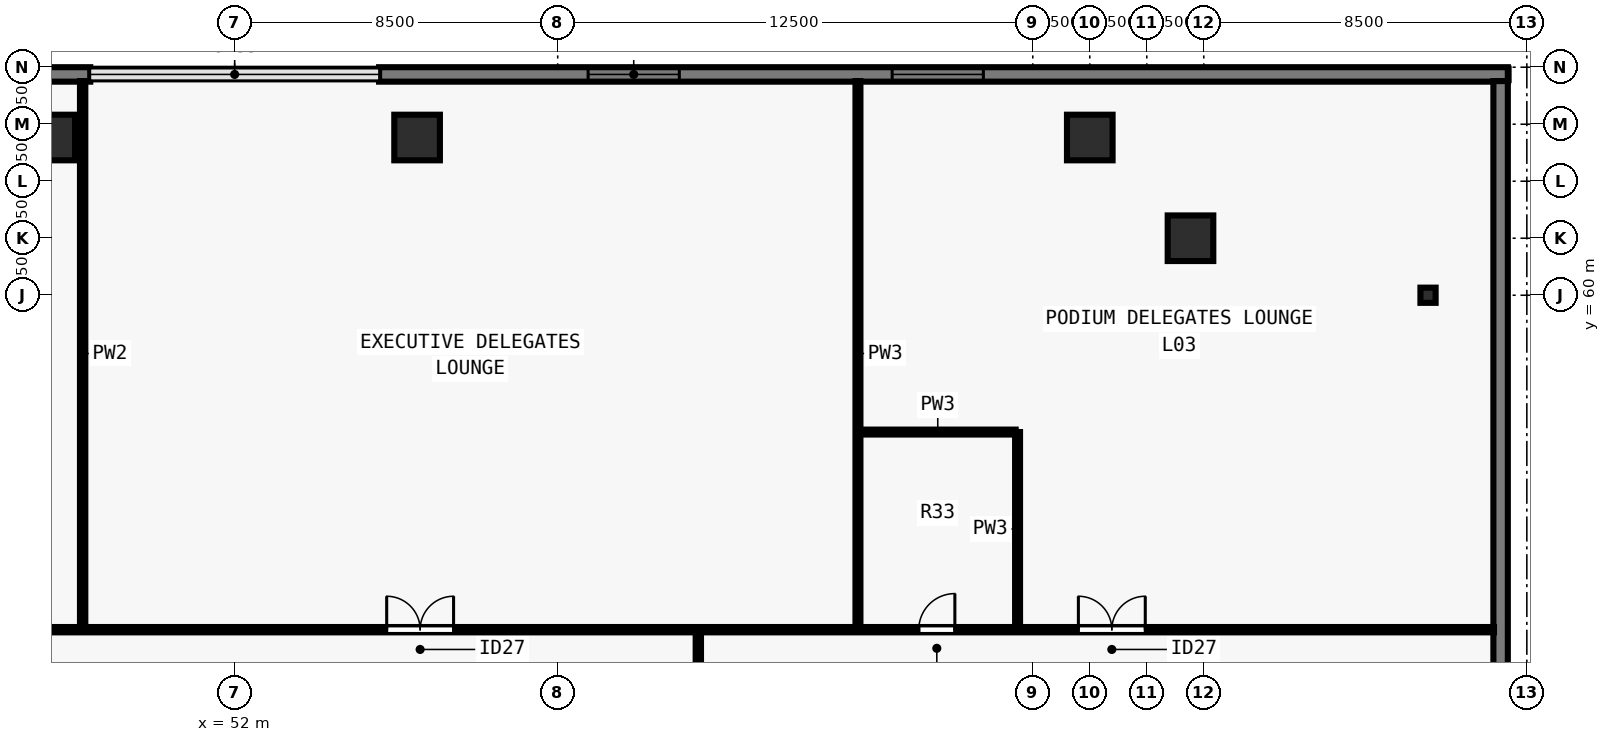
"""IFC4 building model, lengths in metres.
Left out: names, types, materials, properties, quantities, classifications, styles, units other than length and angle.
Written with IfcOpenShell. Run it as: python <this file> out.ifc"""

import sys

from ifc_helpers import new_model, si_unit, direction, frame, frame_2d, origin, origin_2d, place, context, subcontext, project, spatial, rectangle, i_section, extrude, element, fill, save


model = new_model("IFC4")
c1 = context("Model", 3, precision=1e-05, world=origin(), true_north=direction((0.0, 1.0)))
c2 = subcontext(c1, "Body", "Model", "MODEL_VIEW")
j1 = project(units=[si_unit("LENGTHUNIT", "METRE"), si_unit("PLANEANGLEUNIT", "RADIAN")], contexts=[c1])
p1 = place(None, origin())
s1 = spatial("IfcSite", under=j1, at=p1, CompositionType="ELEMENT")
p2 = place(p1, origin())
s2 = spatial("IfcBuilding", under=s1, at=p2, CompositionType="ELEMENT")
p3 = place(p2, frame((0.0, 0.0, 14.5)))
s3 = spatial("IfcBuildingStorey", under=s2, at=p3, CompositionType="ELEMENT", Elevation=14.5)
for number, where, z_axis, x_axis in (
    (1, (77.15, 61.5, 0.0), (0.0, 0.0, 1.0), (1.0, 0.0, 0.0)),
    (2, (74.5, 64.15, 0.0), (0.0, 0.0, 1.0), (1.0, 0.0, 0.0)),
    (3, (56.8, 64.15, 0.0), (0.0, 0.0, 1.0), (1.0, 0.0, 0.0)),
    (4, (47.2, 64.15, 0.0), (0.0, 0.0, 1.0), (1.0, 0.0, 0.0)),
):
    element("IfcColumn", number, at=place(p3, frame(where, z_axis=z_axis, x_axis=x_axis)), inside=s3, PredefinedType="COLUMN", context=c2, shape_type="SweptSolid", body=[
        extrude(rectangle(XDim=1.2, YDim=1.2, at=origin_2d()), origin(), (0.0, 0.0, 1.0), 4.5),
    ])
p4 = place(p3, frame((83.4, 60.0, 0.0), z_axis=(0.0, 0.0, 1.0), x_axis=(1.0, 0.0, 0.0)))
e5 = element("IfcColumn", 5, at=p4, inside=s3, PredefinedType="COLUMN", context=c2, shape_type="SweptSolid", body=[
    extrude(i_section(OverallWidth=0.4, OverallDepth=0.4, WebThickness=0.028, FlangeThickness=0.045, at=origin_2d()), origin(), (0.0, 0.0, 1.0), 4.5),
])
p5 = place(p3, frame((18.5, 65.81, 0.0), z_axis=(0.0, 0.0, 1.0), x_axis=(1.0, 0.0, 0.0)))
e6 = element("IfcWall", 6, at=p5, inside=s3, PredefinedType="SOLIDWALL", context=c2, shape_type="SweptSolid", body=[
    extrude(rectangle(XDim=29.7, YDim=0.38, at=frame_2d((14.85, 0.0))), origin(), (0.0, 0.0, 1.0), 4.15),
])
p6 = place(p5, frame((5.5, 0.0, 0.8)))
e7 = element("IfcOpeningElement", 7, at=p6, cuts=e6, PredefinedType="OPENING", context=c2, shape_type="SweptSolid", body=[
    extrude(rectangle(XDim=2.4, YDim=1.6, at=frame_2d((1.2, 0.8))), frame((0.0, 0.2, 0.0), z_axis=(0.0, -1.0, 0.0), x_axis=(1.0, 0.0, 0.0)), (0.0, 0.0, 1.0), 0.4),
])
p7 = place(p5, frame((13.5, 0.0, 0.8)))
e8 = element("IfcOpeningElement", 8, at=p7, cuts=e6, PredefinedType="OPENING", context=c2, shape_type="SweptSolid", body=[
    extrude(rectangle(XDim=2.4, YDim=1.6, at=frame_2d((1.2, 0.8))), frame((0.0, 0.2, 0.0), z_axis=(0.0, -1.0, 0.0), x_axis=(1.0, 0.0, 0.0)), (0.0, 0.0, 1.0), 0.4),
])
p8 = place(p3, frame((55.8, 65.81, 0.0), z_axis=(0.0, 0.0, 1.0), x_axis=(1.0, 0.0, 0.0)))
e9 = element("IfcWall", 9, at=p8, inside=s3, PredefinedType="SOLIDWALL", context=c2, shape_type="SweptSolid", body=[
    extrude(rectangle(XDim=29.7, YDim=0.38, at=frame_2d((14.85, 0.0))), origin(), (0.0, 0.0, 1.0), 4.15),
])
p9 = place(p8, frame((5.5, 0.0, 0.8)))
e10 = element("IfcOpeningElement", 10, at=p9, cuts=e9, PredefinedType="OPENING", context=c2, shape_type="SweptSolid", body=[
    extrude(rectangle(XDim=2.4, YDim=1.6, at=frame_2d((1.2, 0.8))), frame((0.0, 0.2, 0.0), z_axis=(0.0, -1.0, 0.0), x_axis=(1.0, 0.0, 0.0)), (0.0, 0.0, 1.0), 0.4),
])
p10 = place(p8, frame((13.5, 0.0, 0.8)))
e11 = element("IfcOpeningElement", 11, at=p10, cuts=e9, PredefinedType="OPENING", context=c2, shape_type="SweptSolid", body=[
    extrude(rectangle(XDim=2.4, YDim=1.6, at=frame_2d((1.2, 0.8))), frame((0.0, 0.2, 0.0), z_axis=(0.0, -1.0, 0.0), x_axis=(1.0, 0.0, 0.0)), (0.0, 0.0, 1.0), 0.4),
])
p11 = place(p3, frame((85.31, 65.635, 0.0), z_axis=(0.0, 0.0, 1.0), x_axis=(0.0, -1.0, 0.0)))
e12 = element("IfcWall", 12, at=p11, inside=s3, PredefinedType="SOLIDWALL", context=c2, shape_type="SweptSolid", body=[
    extrude(rectangle(XDim=53.27, YDim=0.38, at=frame_2d((26.635, 0.0))), origin(), (0.0, 0.0, 1.0), 4.15),
])
p12 = place(p3, frame((18.865, 51.2, 0.0), z_axis=(0.0, 0.0, 1.0), x_axis=(1.0, 0.0, 0.0)))
e13 = element("IfcWall", 13, at=p12, inside=s3, PredefinedType="PARTITIONING", context=c2, shape_type="SweptSolid", body=[
    extrude(rectangle(XDim=66.27, YDim=0.14, at=frame_2d((33.135, 0.0))), origin(), (0.0, 0.0, 1.0), 3.668),
])
p13 = place(p12, frame((24.335, 0.0, 0.0)))
e14 = element("IfcOpeningElement", 14, at=p13, cuts=e13, PredefinedType="OPENING", context=c2, shape_type="SweptSolid", body=[
    extrude(rectangle(XDim=1.76, YDim=2.2, at=frame_2d((0.88, 1.1))), frame((0.0, 0.08, 0.0), z_axis=(0.0, -1.0, 0.0), x_axis=(1.0, 0.0, 0.0)), (0.0, 0.0, 1.0), 0.16),
])
p14 = place(p12, frame((37.135, 0.0, 0.0)))
e15 = element("IfcOpeningElement", 15, at=p14, cuts=e13, PredefinedType="OPENING", context=c2, shape_type="SweptSolid", body=[
    extrude(rectangle(XDim=1.76, YDim=2.2, at=frame_2d((0.88, 1.1))), frame((0.0, 0.08, 0.0), z_axis=(0.0, -1.0, 0.0), x_axis=(1.0, 0.0, 0.0)), (0.0, 0.0, 1.0), 0.16),
])
p15 = place(p12, frame((51.135, 0.0, 0.0)))
e16 = element("IfcOpeningElement", 16, at=p15, cuts=e13, PredefinedType="OPENING", context=c2, shape_type="SweptSolid", body=[
    extrude(rectangle(XDim=0.95, YDim=2.1, at=frame_2d((0.475, 1.05))), frame((0.0, 0.08, 0.0), z_axis=(0.0, -1.0, 0.0), x_axis=(1.0, 0.0, 0.0)), (0.0, 0.0, 1.0), 0.16),
])
p16 = place(p12, frame((55.335, 0.0, 0.0)))
e17 = element("IfcOpeningElement", 17, at=p16, cuts=e13, PredefinedType="OPENING", context=c2, shape_type="SweptSolid", body=[
    extrude(rectangle(XDim=1.76, YDim=2.2, at=frame_2d((0.88, 1.1))), frame((0.0, 0.08, 0.0), z_axis=(0.0, -1.0, 0.0), x_axis=(1.0, 0.0, 0.0)), (0.0, 0.0, 1.0), 0.16),
])
p17 = place(p3, frame((64.2, 26.855, 0.0), z_axis=(0.0, 0.0, 1.0), x_axis=(0.0, 1.0, 0.0)))
e18 = element("IfcWall", 18, at=p17, inside=s3, PredefinedType="PARTITIONING", context=c2, shape_type="SweptSolid", body=[
    extrude(rectangle(XDim=24.29, YDim=0.14, at=frame_2d((12.145, 0.0))), origin(), (0.0, 0.0, 1.0), 4.15),
])
p18 = place(p17, frame((10.945, 0.0, 0.0)))
e19 = element("IfcOpeningElement", 19, at=p18, cuts=e18, PredefinedType="OPENING", context=c2, shape_type="SweptSolid", body=[
    extrude(rectangle(XDim=1.76, YDim=2.2, at=frame_2d((0.88, 1.1))), frame((0.0, 0.08, 0.0), z_axis=(0.0, -1.0, 0.0), x_axis=(1.0, 0.0, 0.0)), (0.0, 0.0, 1.0), 0.16),
])
p19 = place(p3, frame((48.0, 51.3, 0.0), z_axis=(0.0, 0.0, 1.0), x_axis=(0.0, 1.0, 0.0)))
e20 = element("IfcWall", 20, at=p19, inside=s3, PredefinedType="PARTITIONING", context=c2, shape_type="SweptSolid", body=[
    extrude(rectangle(XDim=14.335, YDim=0.14, at=frame_2d((7.167, 0.0))), origin(), (0.0, 0.0, 1.0), 4.15),
])
p20 = place(p3, frame((68.4, 51.3, 0.0), z_axis=(0.0, 0.0, 1.0), x_axis=(0.0, 1.0, 0.0)))
e21 = element("IfcWall", 21, at=p20, inside=s3, PredefinedType="PLUMBINGWALL", context=c2, shape_type="SweptSolid", body=[
    extrude(rectangle(XDim=14.335, YDim=0.13, at=frame_2d((7.167, 0.0))), origin(), (0.0, 0.0, 1.0), 3.201),
])
p21 = place(p3, frame((72.6, 51.3, 0.0), z_axis=(0.0, 0.0, 1.0), x_axis=(0.0, 1.0, 0.0)))
e22 = element("IfcWall", 22, at=p21, inside=s3, PredefinedType="PLUMBINGWALL", context=c2, shape_type="SweptSolid", body=[
    extrude(rectangle(XDim=5.1, YDim=0.13, at=frame_2d((2.55, 0.0))), origin(), (0.0, 0.0, 1.0), 4.15),
])
p22 = place(p3, frame((68.45, 56.4, 0.0), z_axis=(0.0, 0.0, 1.0), x_axis=(1.0, 0.0, 0.0)))
e23 = element("IfcWall", 23, at=p22, inside=s3, PredefinedType="PLUMBINGWALL", context=c2, shape_type="SweptSolid", body=[
    extrude(rectangle(XDim=4.1, YDim=0.13, at=frame_2d((2.05, 0.0))), origin(), (0.0, 0.0, 1.0), 3.668),
])
p23 = place(p9, origin())
e24 = element("IfcWindow", 24, at=p23, inside=s3, PartitioningType="SINGLE_PANEL", PredefinedType="WINDOW", context=c2, shape_type="SweptSolid", body=[
    extrude(rectangle(XDim=2.4, YDim=1.6, at=frame_2d((1.2, 0.8))), frame((0.0, -0.05, 0.0), z_axis=(0.0, -1.0, 0.0), x_axis=(1.0, 0.0, 0.0)), (0.0, 0.0, 1.0), 0.06),
])
fill(e10, e24)
p24 = place(p10, origin())
e25 = element("IfcWindow", 25, at=p24, inside=s3, PartitioningType="SINGLE_PANEL", PredefinedType="WINDOW", context=c2, shape_type="SweptSolid", body=[
    extrude(rectangle(XDim=2.4, YDim=1.6, at=frame_2d((1.2, 0.8))), frame((0.0, -0.05, 0.0), z_axis=(0.0, -1.0, 0.0), x_axis=(1.0, 0.0, 0.0)), (0.0, 0.0, 1.0), 0.06),
])
fill(e11, e25)
p25 = place(p14, origin())
e26 = element("IfcDoor", 26, at=p25, inside=s3, OperationType="DOUBLE_DOOR_SINGLE_SWING", PredefinedType="DOOR", context=c2, shape_type="SweptSolid", body=[
    extrude(rectangle(XDim=1.76, YDim=2.2, at=frame_2d((0.88, 1.1))), frame((0.0, 0.025, 0.0), z_axis=(0.0, -1.0, 0.0), x_axis=(1.0, 0.0, 0.0)), (0.0, 0.0, 1.0), 0.05),
])
fill(e15, e26)
p26 = place(p15, origin())
e27 = element("IfcDoor", 27, at=p26, inside=s3, OperationType="SINGLE_SWING_RIGHT", PredefinedType="DOOR", context=c2, shape_type="SweptSolid", body=[
    extrude(rectangle(XDim=0.95, YDim=2.1, at=frame_2d((0.475, 1.05))), frame((0.0, 0.025, 0.0), z_axis=(0.0, -1.0, 0.0), x_axis=(1.0, 0.0, 0.0)), (0.0, 0.0, 1.0), 0.05),
])
fill(e16, e27)
p27 = place(p16, origin())
e28 = element("IfcDoor", 28, at=p27, inside=s3, OperationType="DOUBLE_DOOR_SINGLE_SWING", PredefinedType="DOOR", context=c2, shape_type="SweptSolid", body=[
    extrude(rectangle(XDim=1.76, YDim=2.2, at=frame_2d((0.88, 1.1))), frame((0.0, 0.025, 0.0), z_axis=(0.0, -1.0, 0.0), x_axis=(1.0, 0.0, 0.0)), (0.0, 0.0, 1.0), 0.05),
])
fill(e17, e28)
save(model, sys.argv[1])
